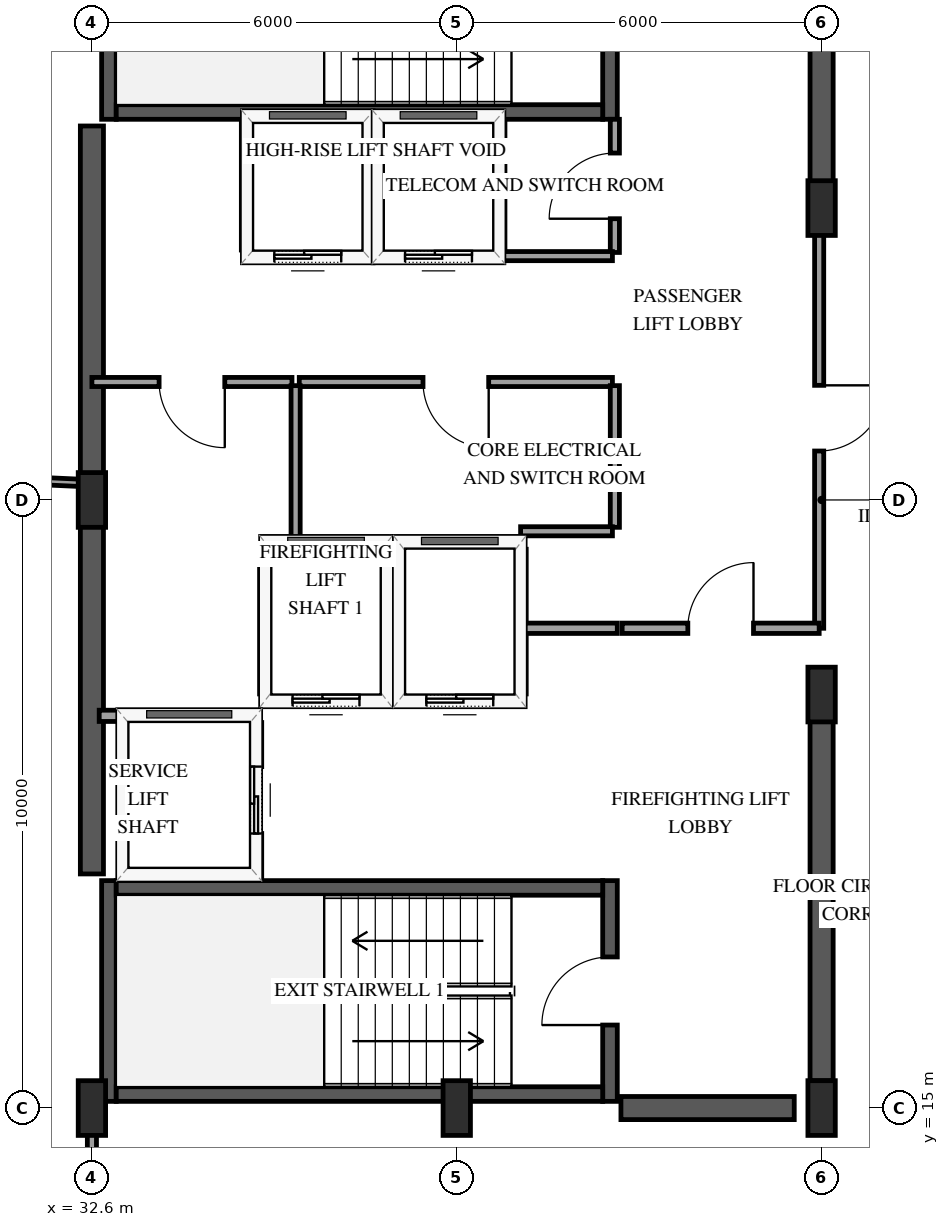
"""IFC4 building model, lengths in metres.
Left out: names, types, materials, properties, quantities, classifications, styles, units other than length and angle.
Written with IfcOpenShell. Run it as: python <this file> out.ifc"""

import sys

from ifc_helpers import new_model, si_unit, direction, frame, frame_2d, origin, origin_2d, place, context, subcontext, project, spatial, rectangle, extrude, element, fill, save


model = new_model("IFC4")
c1 = context("Model", 3, precision=1e-05, world=origin(), true_north=direction((0.0, 1.0)))
c2 = subcontext(c1, "Body", "Model", "MODEL_VIEW")
j1 = project(units=[si_unit("LENGTHUNIT", "METRE"), si_unit("PLANEANGLEUNIT", "RADIAN")], contexts=[c1])
p1 = place(None, origin())
s1 = spatial("IfcSite", under=j1, at=p1, CompositionType="ELEMENT")
p2 = place(p1, origin())
s2 = spatial("IfcBuilding", under=s1, at=p2, CompositionType="ELEMENT")
p3 = place(p2, frame((0.0, 0.0, 293.05)))
s3 = spatial("IfcBuildingStorey", under=s2, at=p3, CompositionType="ELEMENT", Elevation=293.05)
p4 = place(p3, frame((32.88, 15.11, 0.0), z_axis=(0.0, 0.0, 1.0), x_axis=(0.0, 1.0, 0.0)))
e1 = element("IfcWall", 1, at=p4, inside=s3, PredefinedType="SHEAR", context=c2, shape_type="SweptSolid", body=[
    extrude(rectangle(XDim=3.63, YDim=0.24, at=frame_2d((1.815, 0.0))), origin(), (0.0, 0.0, 1.0), 4.2),
])
p5 = place(p3, frame((41.12, 15.11, 0.0), z_axis=(0.0, 0.0, 1.0), x_axis=(0.0, 1.0, 0.0)))
e2 = element("IfcWall", 2, at=p5, inside=s3, PredefinedType="SHEAR", context=c2, shape_type="SweptSolid", body=[
    extrude(rectangle(XDim=3.63, YDim=0.24, at=frame_2d((1.815, 0.0))), origin(), (0.0, 0.0, 1.0), 4.2),
])
p6 = place(p5, frame((1.255, 0.0, 0.0)))
e3 = element("IfcOpeningElement", 3, at=p6, cuts=e2, PredefinedType="OPENING", context=c2, shape_type="SweptSolid", body=[
    extrude(rectangle(XDim=1.12, YDim=2.15, at=frame_2d((0.56, 1.075))), frame((0.0, 0.13, 0.0), z_axis=(0.0, -1.0, 0.0), x_axis=(1.0, 0.0, 0.0)), (0.0, 0.0, 1.0), 0.26),
])
for number, where, z_axis, x_axis in (
    (4, (33.0, 15.23, 0.0), (0.0, 0.0, 1.0), (1.0, 0.0, 0.0)),
    (5, (33.0, 18.62, 0.0), (0.0, 0.0, 1.0), (1.0, 0.0, 0.0)),
):
    element("IfcWall", number, at=place(p3, frame(where, z_axis=z_axis, x_axis=x_axis)), inside=s3, PredefinedType="SHEAR", context=c2, shape_type="SweptSolid", body=[
        extrude(rectangle(XDim=8.0, YDim=0.24, at=frame_2d((4.0, 0.0))), origin(), (0.0, 0.0, 1.0), 4.2),
    ])
p7 = place(p3, frame((32.88, 31.26, 0.0), z_axis=(0.0, 0.0, 1.0), x_axis=(0.0, 1.0, 0.0)))
e6 = element("IfcWall", 6, at=p7, inside=s3, PredefinedType="SHEAR", context=c2, shape_type="SweptSolid", body=[
    extrude(rectangle(XDim=3.63, YDim=0.24, at=frame_2d((1.815, 0.0))), origin(), (0.0, 0.0, 1.0), 4.2),
])
p8 = place(p3, frame((41.12, 31.26, 0.0), z_axis=(0.0, 0.0, 1.0), x_axis=(0.0, 1.0, 0.0)))
e7 = element("IfcWall", 7, at=p8, inside=s3, PredefinedType="SHEAR", context=c2, shape_type="SweptSolid", body=[
    extrude(rectangle(XDim=3.63, YDim=0.24, at=frame_2d((1.815, 0.0))), origin(), (0.0, 0.0, 1.0), 4.2),
])
p9 = place(p8, frame((1.255, 0.0, 0.0)))
e8 = element("IfcOpeningElement", 8, at=p9, cuts=e7, PredefinedType="OPENING", context=c2, shape_type="SweptSolid", body=[
    extrude(rectangle(XDim=1.12, YDim=2.15, at=frame_2d((0.56, 1.075))), frame((0.0, 0.13, 0.0), z_axis=(0.0, -1.0, 0.0), x_axis=(1.0, 0.0, 0.0)), (0.0, 0.0, 1.0), 0.26),
])
p10 = place(p3, frame((33.0, 31.38, 0.0), z_axis=(0.0, 0.0, 1.0), x_axis=(1.0, 0.0, 0.0)))
e9 = element("IfcWall", 9, at=p10, inside=s3, PredefinedType="SHEAR", context=c2, shape_type="SweptSolid", body=[
    extrude(rectangle(XDim=8.0, YDim=0.24, at=frame_2d((4.0, 0.0))), origin(), (0.0, 0.0, 1.0), 4.2),
])
p11 = place(p3, frame((32.6, 18.85, 0.0), z_axis=(0.0, 0.0, 1.0), x_axis=(0.0, 1.0, 0.0)))
e10 = element("IfcWall", 10, at=p11, inside=s3, PredefinedType="SHEAR", context=c2, shape_type="SweptSolid", body=[
    extrude(rectangle(XDim=12.3, YDim=0.38, at=frame_2d((6.15, 0.0))), origin(), (0.0, 0.0, 1.0), 4.2),
])
p12 = place(p3, frame((41.3, 15.0, 0.0), z_axis=(0.0, 0.0, 1.0), x_axis=(1.0, 0.0, 0.0)))
e11 = element("IfcWall", 11, at=p12, inside=s3, PredefinedType="SHEAR", context=c2, shape_type="SweptSolid", body=[
    extrude(rectangle(XDim=2.85, YDim=0.38, at=frame_2d((1.425, 0.0))), origin(), (0.0, 0.0, 1.0), 4.2),
])
p13 = place(p3, frame((44.6, 15.45, 0.0), z_axis=(0.0, 0.0, 1.0), x_axis=(0.0, 1.0, 0.0)))
e12 = element("IfcWall", 12, at=p13, inside=s3, PredefinedType="SHEAR", context=c2, shape_type="SweptSolid", body=[
    extrude(rectangle(XDim=6.35, YDim=0.38, at=frame_2d((3.175, 0.0))), origin(), (0.0, 0.0, 1.0), 4.2),
])
p14 = place(p3, frame((44.6, 29.8, 0.0), z_axis=(0.0, 0.0, 1.0), x_axis=(0.0, 1.0, 0.0)))
e13 = element("IfcWall", 13, at=p14, inside=s3, PredefinedType="SHEAR", context=c2, shape_type="SweptSolid", body=[
    extrude(rectangle(XDim=4.75, YDim=0.38, at=frame_2d((2.375, 0.0))), origin(), (0.0, 0.0, 1.0), 4.2),
])
for number, where, z_axis, x_axis in (
    (14, (32.6, 15.0, -0.305), (0.0, 0.0, 1.0), (1.0, 0.0, 0.0)),
    (15, (32.6, 25.0, -0.305), (0.0, 0.0, 1.0), (1.0, 0.0, 0.0)),
    (16, (38.6, 15.0, -0.305), (0.0, 0.0, 1.0), (1.0, 0.0, 0.0)),
    (17, (44.6, 15.0, -0.305), (0.0, 0.0, 1.0), (1.0, 0.0, 0.0)),
    (18, (44.6, 21.8, -0.305), (0.0, 0.0, 1.0), (1.0, 0.0, 0.0)),
    (19, (44.6, 29.8, -0.305), (0.0, 0.0, 1.0), (1.0, 0.0, 0.0)),
):
    element("IfcColumn", number, at=place(p3, frame(where, z_axis=z_axis, x_axis=x_axis)), inside=s3, PredefinedType="PILASTER", context=c2, shape_type="SweptSolid", body=[
        extrude(rectangle(XDim=0.45, YDim=0.9, at=origin_2d()), origin(), (0.0, 0.0, 1.0), 4.505),
    ])
p15 = place(p3, frame((35.45, 21.7, 0.0), z_axis=(0.0, 0.0, 1.0), x_axis=(1.0, 0.0, 0.0)))
e20 = element("IfcWall", 20, at=p15, inside=s3, PredefinedType="SOLIDWALL", context=c2, shape_type="SweptSolid", body=[
    extrude(rectangle(XDim=2.0, YDim=0.185, at=frame_2d((1.0, 0.0))), origin(), (0.0, 0.0, 1.0), 3.895),
])
p16 = place(p15, frame((0.45, 0.0, 0.0)))
e21 = element("IfcOpeningElement", 21, at=p16, cuts=e20, PredefinedType="OPENING", context=c2, shape_type="SweptSolid", body=[
    extrude(rectangle(XDim=1.1, YDim=2.15, at=frame_2d((0.55, 1.075))), frame((0.0, 0.103, 0.0), z_axis=(0.0, -1.0, 0.0), x_axis=(1.0, 0.0, 0.0)), (0.0, 0.0, 1.0), 0.205),
])
p17 = place(p3, frame((35.45, 24.3, 0.0), z_axis=(0.0, 0.0, 1.0), x_axis=(1.0, 0.0, 0.0)))
e22 = element("IfcWall", 22, at=p17, inside=s3, PredefinedType="SOLIDWALL", context=c2, shape_type="SweptSolid", body=[
    extrude(rectangle(XDim=2.0, YDim=0.185, at=frame_2d((1.0, 0.0))), origin(), (0.0, 0.0, 1.0), 3.895),
])
for number, where, z_axis, x_axis in (
    (23, (35.45, 21.81, 0.0), (0.0, 0.0, 1.0), (0.0, 1.0, 0.0)),
    (24, (37.45, 21.81, 0.0), (0.0, 0.0, 1.0), (0.0, 1.0, 0.0)),
):
    element("IfcWall", number, at=place(p3, frame(where, z_axis=z_axis, x_axis=x_axis)), inside=s3, PredefinedType="SOLIDWALL", context=c2, shape_type="SweptSolid", body=[
        extrude(rectangle(XDim=2.38, YDim=0.185, at=frame_2d((1.19, 0.0))), origin(), (0.0, 0.0, 1.0), 3.895),
    ])
p18 = place(p3, frame((37.65, 21.7, 0.0), z_axis=(0.0, 0.0, 1.0), x_axis=(1.0, 0.0, 0.0)))
e25 = element("IfcWall", 25, at=p18, inside=s3, PredefinedType="SOLIDWALL", context=c2, shape_type="SweptSolid", body=[
    extrude(rectangle(XDim=2.0, YDim=0.185, at=frame_2d((1.0, 0.0))), origin(), (0.0, 0.0, 1.0), 3.895),
])
p19 = place(p18, frame((0.45, 0.0, 0.0)))
e26 = element("IfcOpeningElement", 26, at=p19, cuts=e25, PredefinedType="OPENING", context=c2, shape_type="SweptSolid", body=[
    extrude(rectangle(XDim=1.1, YDim=2.15, at=frame_2d((0.55, 1.075))), frame((0.0, 0.103, 0.0), z_axis=(0.0, -1.0, 0.0), x_axis=(1.0, 0.0, 0.0)), (0.0, 0.0, 1.0), 0.205),
])
p20 = place(p3, frame((37.65, 24.3, 0.0), z_axis=(0.0, 0.0, 1.0), x_axis=(1.0, 0.0, 0.0)))
e27 = element("IfcWall", 27, at=p20, inside=s3, PredefinedType="SOLIDWALL", context=c2, shape_type="SweptSolid", body=[
    extrude(rectangle(XDim=2.0, YDim=0.185, at=frame_2d((1.0, 0.0))), origin(), (0.0, 0.0, 1.0), 3.895),
])
p21 = place(p3, frame((39.65, 21.81, 0.0), z_axis=(0.0, 0.0, 1.0), x_axis=(0.0, 1.0, 0.0)))
e28 = element("IfcWall", 28, at=p21, inside=s3, PredefinedType="SOLIDWALL", context=c2, shape_type="SweptSolid", body=[
    extrude(rectangle(XDim=2.38, YDim=0.185, at=frame_2d((1.19, 0.0))), origin(), (0.0, 0.0, 1.0), 3.895),
])
p22 = place(p3, frame((32.72, 21.45, 0.0), z_axis=(0.0, 0.0, 1.0), x_axis=(1.0, 0.0, 0.0)))
e29 = element("IfcWall", 29, at=p22, inside=s3, PredefinedType="SOLIDWALL", context=c2, shape_type="SweptSolid", body=[
    extrude(rectangle(XDim=2.58, YDim=0.185, at=frame_2d((1.29, 0.0))), origin(), (0.0, 0.0, 1.0), 3.895),
])
p23 = place(p3, frame((35.3, 18.79, 0.0), z_axis=(0.0, 0.0, 1.0), x_axis=(0.0, 1.0, 0.0)))
e30 = element("IfcWall", 30, at=p23, inside=s3, PredefinedType="SOLIDWALL", context=c2, shape_type="SweptSolid", body=[
    extrude(rectangle(XDim=2.55, YDim=0.185, at=frame_2d((1.275, 0.0))), origin(), (0.0, 0.0, 1.0), 3.895),
])
p24 = place(p23, frame((0.725, 0.0, 0.0)))
e31 = element("IfcOpeningElement", 31, at=p24, cuts=e30, PredefinedType="OPENING", context=c2, shape_type="SweptSolid", body=[
    extrude(rectangle(XDim=1.1, YDim=2.15, at=frame_2d((0.55, 1.075))), frame((0.0, 0.103, 0.0), z_axis=(0.0, -1.0, 0.0), x_axis=(1.0, 0.0, 0.0)), (0.0, 0.0, 1.0), 0.205),
])
p25 = place(p3, frame((35.15, 29.0, 0.0), z_axis=(0.0, 0.0, 1.0), x_axis=(1.0, 0.0, 0.0)))
e32 = element("IfcWall", 32, at=p25, inside=s3, PredefinedType="SOLIDWALL", context=c2, shape_type="SweptSolid", body=[
    extrude(rectangle(XDim=2.0, YDim=0.185, at=frame_2d((1.0, 0.0))), origin(), (0.0, 0.0, 1.0), 3.895),
])
p26 = place(p25, frame((0.45, 0.0, 0.0)))
e33 = element("IfcOpeningElement", 33, at=p26, cuts=e32, PredefinedType="OPENING", context=c2, shape_type="SweptSolid", body=[
    extrude(rectangle(XDim=1.1, YDim=2.15, at=frame_2d((0.55, 1.075))), frame((0.0, 0.103, 0.0), z_axis=(0.0, -1.0, 0.0), x_axis=(1.0, 0.0, 0.0)), (0.0, 0.0, 1.0), 0.205),
])
for number, where, z_axis, x_axis in (
    (34, (35.15, 29.11, 0.0), (0.0, 0.0, 1.0), (0.0, 1.0, 0.0)),
    (35, (37.15, 29.11, 0.0), (0.0, 0.0, 1.0), (0.0, 1.0, 0.0)),
):
    element("IfcWall", number, at=place(p3, frame(where, z_axis=z_axis, x_axis=x_axis)), inside=s3, PredefinedType="SOLIDWALL", context=c2, shape_type="SweptSolid", body=[
        extrude(rectangle(XDim=2.1, YDim=0.185, at=frame_2d((1.05, 0.0))), origin(), (0.0, 0.0, 1.0), 3.895),
    ])
p27 = place(p3, frame((37.3, 29.0, 0.0), z_axis=(0.0, 0.0, 1.0), x_axis=(1.0, 0.0, 0.0)))
e36 = element("IfcWall", 36, at=p27, inside=s3, PredefinedType="SOLIDWALL", context=c2, shape_type="SweptSolid", body=[
    extrude(rectangle(XDim=2.0, YDim=0.185, at=frame_2d((1.0, 0.0))), origin(), (0.0, 0.0, 1.0), 3.895),
])
p28 = place(p27, frame((0.45, 0.0, 0.0)))
e37 = element("IfcOpeningElement", 37, at=p28, cuts=e36, PredefinedType="OPENING", context=c2, shape_type="SweptSolid", body=[
    extrude(rectangle(XDim=1.1, YDim=2.15, at=frame_2d((0.55, 1.075))), frame((0.0, 0.103, 0.0), z_axis=(0.0, -1.0, 0.0), x_axis=(1.0, 0.0, 0.0)), (0.0, 0.0, 1.0), 0.205),
])
p29 = place(p3, frame((39.3, 29.11, 0.0), z_axis=(0.0, 0.0, 1.0), x_axis=(0.0, 1.0, 0.0)))
e38 = element("IfcWall", 38, at=p29, inside=s3, PredefinedType="SOLIDWALL", context=c2, shape_type="SweptSolid", body=[
    extrude(rectangle(XDim=2.1, YDim=0.185, at=frame_2d((1.05, 0.0))), origin(), (0.0, 0.0, 1.0), 3.895),
])
p30 = place(p3, frame((32.527, 25.276, 0.0), z_axis=(0.0, 0.0, 1.0), x_axis=(-0.998965703411, 0.045470027593, 0.0)))
e39 = element("IfcWall", 39, at=p30, inside=s3, PredefinedType="PARTITIONING", context=c2, shape_type="SweptSolid", body=[
    extrude(rectangle(XDim=7.458, YDim=0.12, at=frame_2d((3.729, 0.0))), origin(), (0.0, 0.0, 1.0), 3.19),
])
p31 = place(p3, frame((44.56, 29.8, 0.0), z_axis=(0.0, 0.0, 1.0), x_axis=(0.0, -1.0, 0.0)))
e40 = element("IfcWall", 40, at=p31, inside=s3, PredefinedType="PARTITIONING", context=c2, shape_type="SweptSolid", body=[
    extrude(rectangle(XDim=6.91, YDim=0.15, at=frame_2d((3.455, 0.0))), origin(), (0.0, 0.0, 1.0), 2.935),
])
p32 = place(p31, frame((2.915, 0.0, 0.0)))
e41 = element("IfcOpeningElement", 41, at=p32, cuts=e40, PredefinedType="OPENING", context=c2, shape_type="SweptSolid", body=[
    extrude(rectangle(XDim=1.08, YDim=2.15, at=frame_2d((0.54, 1.075))), frame((0.0, 0.085, 0.0), z_axis=(0.0, -1.0, 0.0), x_axis=(1.0, 0.0, 0.0)), (0.0, 0.0, 1.0), 0.17),
])
p33 = place(p3, frame((41.16, 26.94, 0.0), z_axis=(0.0, 0.0, 1.0), x_axis=(-1.0, 0.0, 0.0)))
e42 = element("IfcWall", 42, at=p33, inside=s3, PredefinedType="PARTITIONING", context=c2, shape_type="SweptSolid", body=[
    extrude(rectangle(XDim=5.15, YDim=0.15, at=frame_2d((2.575, 0.0))), origin(), (0.0, 0.0, 1.0), 3.895),
])
p34 = place(p33, frame((2.035, 0.0, 0.0)))
e43 = element("IfcOpeningElement", 43, at=p34, cuts=e42, PredefinedType="OPENING", context=c2, shape_type="SweptSolid", body=[
    extrude(rectangle(XDim=1.08, YDim=2.15, at=frame_2d((0.54, 1.075))), frame((0.0, 0.085, 0.0), z_axis=(0.0, -1.0, 0.0), x_axis=(1.0, 0.0, 0.0)), (0.0, 0.0, 1.0), 0.17),
])
p35 = place(p3, frame((35.89, 26.94, 0.0), z_axis=(0.0, 0.0, 1.0), x_axis=(-1.0, 0.0, 0.0)))
e44 = element("IfcWall", 44, at=p35, inside=s3, PredefinedType="PARTITIONING", context=c2, shape_type="SweptSolid", body=[
    extrude(rectangle(XDim=3.29, YDim=0.15, at=frame_2d((1.645, 0.0))), origin(), (0.0, 0.0, 1.0), 3.895),
])
p36 = place(p35, frame((1.105, 0.0, 0.0)))
e45 = element("IfcOpeningElement", 45, at=p36, cuts=e44, PredefinedType="OPENING", context=c2, shape_type="SweptSolid", body=[
    extrude(rectangle(XDim=1.08, YDim=2.15, at=frame_2d((0.54, 1.075))), frame((0.0, 0.085, 0.0), z_axis=(0.0, -1.0, 0.0), x_axis=(1.0, 0.0, 0.0)), (0.0, 0.0, 1.0), 0.17),
])
p37 = place(p3, frame((41.32, 22.89, 0.0), z_axis=(0.0, 0.0, 1.0), x_axis=(1.0, 0.0, 0.0)))
e46 = element("IfcWall", 46, at=p37, inside=s3, PredefinedType="PARTITIONING", context=c2, shape_type="SweptSolid", body=[
    extrude(rectangle(XDim=3.24, YDim=0.17, at=frame_2d((1.62, 0.0))), origin(), (0.0, 0.0, 1.0), 3.895),
])
p38 = place(p37, frame((1.08, 0.0, 0.0)))
e47 = element("IfcOpeningElement", 47, at=p38, cuts=e46, PredefinedType="OPENING", context=c2, shape_type="SweptSolid", body=[
    extrude(rectangle(XDim=1.08, YDim=2.15, at=frame_2d((0.54, 1.075))), frame((0.0, 0.095, 0.0), z_axis=(0.0, -1.0, 0.0), x_axis=(1.0, 0.0, 0.0)), (0.0, 0.0, 1.0), 0.19),
])
p39 = place(p3, frame((35.95, 26.88, 0.0), z_axis=(0.0, 0.0, 1.0), x_axis=(0.0, -1.0, 0.0)))
e48 = element("IfcWall", 48, at=p39, inside=s3, PredefinedType="PARTITIONING", context=c2, shape_type="SweptSolid", body=[
    extrude(rectangle(XDim=2.58, YDim=0.15, at=frame_2d((1.29, 0.0))), origin(), (0.0, 0.0, 1.0), 3.895),
])
p40 = place(p3, frame((41.2, 24.55, 0.0), z_axis=(0.0, 0.0, 1.0), x_axis=(0.0, 1.0, 0.0)))
e49 = element("IfcWall", 49, at=p40, inside=s3, PredefinedType="PARTITIONING", context=c2, shape_type="SweptSolid", body=[
    extrude(rectangle(XDim=2.33, YDim=0.15, at=frame_2d((1.165, 0.0))), origin(), (0.0, 0.0, 1.0), 3.895),
])
p41 = place(p3, frame((41.2, 29.07, 0.0), z_axis=(0.0, 0.0, 1.0), x_axis=(0.0, 1.0, 0.0)))
e50 = element("IfcWall", 50, at=p41, inside=s3, PredefinedType="PARTITIONING", context=c2, shape_type="SweptSolid", body=[
    extrude(rectangle(XDim=2.19, YDim=0.15, at=frame_2d((1.095, 0.0))), origin(), (0.0, 0.0, 1.0), 3.895),
])
p42 = place(p41, frame((0.555, 0.0, 0.0)))
e51 = element("IfcOpeningElement", 51, at=p42, cuts=e50, PredefinedType="OPENING", context=c2, shape_type="SweptSolid", body=[
    extrude(rectangle(XDim=1.08, YDim=2.15, at=frame_2d((0.54, 1.075))), frame((0.0, 0.085, 0.0), z_axis=(0.0, -1.0, 0.0), x_axis=(1.0, 0.0, 0.0)), (0.0, 0.0, 1.0), 0.17),
])
p43 = place(p3, frame((39.3, 29.01, 0.0), z_axis=(0.0, 0.0, 1.0), x_axis=(1.0, 0.0, 0.0)))
e52 = element("IfcWall", 52, at=p43, inside=s3, PredefinedType="PARTITIONING", context=c2, shape_type="SweptSolid", body=[
    extrude(rectangle(XDim=1.86, YDim=0.15, at=frame_2d((0.93, 0.0))), origin(), (0.0, 0.0, 1.0), 3.895),
])
p44 = place(p3, frame((39.72, 22.89, 0.0), z_axis=(0.0, 0.0, 1.0), x_axis=(1.0, 0.0, 0.0)))
e53 = element("IfcWall", 53, at=p44, inside=s3, PredefinedType="PARTITIONING", context=c2, shape_type="SweptSolid", body=[
    extrude(rectangle(XDim=1.52, YDim=0.17, at=frame_2d((0.76, 0.0))), origin(), (0.0, 0.0, 1.0), 3.895),
])
p45 = place(p3, frame((32.6, 13.37, 0.0), z_axis=(0.0, 0.0, 1.0), x_axis=(0.0, 1.0, 0.0)))
e54 = element("IfcWall", 54, at=p45, inside=s3, PredefinedType="PARTITIONING", context=c2, shape_type="SweptSolid", body=[
    extrude(rectangle(XDim=1.51, YDim=0.15, at=frame_2d((0.755, 0.0))), origin(), (0.0, 0.0, 1.0), 3.895),
])
p46 = place(p3, frame((39.65, 24.485, 0.0), z_axis=(0.0, 0.0, 1.0), x_axis=(1.0, 0.0, 0.0)))
e55 = element("IfcWall", 55, at=p46, inside=s3, PredefinedType="PARTITIONING", context=c2, shape_type="SweptSolid", body=[
    extrude(rectangle(XDim=1.51, YDim=0.15, at=frame_2d((0.755, 0.0))), origin(), (0.0, 0.0, 1.0), 3.895),
])
p47 = place(p16, origin())
e56 = element("IfcDoor", 56, at=p47, inside=s3, OperationType="SLIDING_TO_LEFT", PredefinedType="DOOR", context=c2, shape_type="SweptSolid", body=[
    extrude(rectangle(XDim=1.1, YDim=2.15, at=frame_2d((0.55, 1.075))), frame((0.0, 0.025, 0.0), z_axis=(0.0, -1.0, 0.0), x_axis=(1.0, 0.0, 0.0)), (0.0, 0.0, 1.0), 0.05),
])
fill(e21, e56)
p48 = place(p19, origin())
e57 = element("IfcDoor", 57, at=p48, inside=s3, OperationType="SLIDING_TO_LEFT", PredefinedType="DOOR", context=c2, shape_type="SweptSolid", body=[
    extrude(rectangle(XDim=1.1, YDim=2.15, at=frame_2d((0.55, 1.075))), frame((0.0, 0.025, 0.0), z_axis=(0.0, -1.0, 0.0), x_axis=(1.0, 0.0, 0.0)), (0.0, 0.0, 1.0), 0.05),
])
fill(e26, e57)
p49 = place(p24, origin())
e58 = element("IfcDoor", 58, at=p49, inside=s3, OperationType="SLIDING_TO_LEFT", PredefinedType="DOOR", context=c2, shape_type="SweptSolid", body=[
    extrude(rectangle(XDim=1.1, YDim=2.15, at=frame_2d((0.55, 1.075))), frame((0.0, 0.025, 0.0), z_axis=(0.0, -1.0, 0.0), x_axis=(1.0, 0.0, 0.0)), (0.0, 0.0, 1.0), 0.05),
])
fill(e31, e58)
p50 = place(p26, origin())
e59 = element("IfcDoor", 59, at=p50, inside=s3, OperationType="SLIDING_TO_LEFT", PredefinedType="DOOR", context=c2, shape_type="SweptSolid", body=[
    extrude(rectangle(XDim=1.1, YDim=2.15, at=frame_2d((0.55, 1.075))), frame((0.0, 0.025, 0.0), z_axis=(0.0, -1.0, 0.0), x_axis=(1.0, 0.0, 0.0)), (0.0, 0.0, 1.0), 0.05),
])
fill(e33, e59)
p51 = place(p28, origin())
e60 = element("IfcDoor", 60, at=p51, inside=s3, OperationType="SLIDING_TO_LEFT", PredefinedType="DOOR", context=c2, shape_type="SweptSolid", body=[
    extrude(rectangle(XDim=1.1, YDim=2.15, at=frame_2d((0.55, 1.075))), frame((0.0, 0.025, 0.0), z_axis=(0.0, -1.0, 0.0), x_axis=(1.0, 0.0, 0.0)), (0.0, 0.0, 1.0), 0.05),
])
fill(e37, e60)
p52 = place(p6, origin())
e61 = element("IfcDoor", 61, at=p52, inside=s3, OperationType="SINGLE_SWING_LEFT", PredefinedType="DOOR", context=c2, shape_type="SweptSolid", body=[
    extrude(rectangle(XDim=1.12, YDim=2.15, at=frame_2d((0.56, 1.075))), frame((0.0, 0.025, 0.0), z_axis=(0.0, -1.0, 0.0), x_axis=(1.0, 0.0, 0.0)), (0.0, 0.0, 1.0), 0.05),
])
fill(e3, e61)
p53 = place(p32, origin())
e62 = element("IfcDoor", 62, at=p53, inside=s3, OperationType="SINGLE_SWING_LEFT", PredefinedType="DOOR", context=c2, shape_type="SweptSolid", body=[
    extrude(rectangle(XDim=1.08, YDim=2.15, at=frame_2d((0.54, 1.075))), frame((0.0, 0.025, 0.0), z_axis=(0.0, -1.0, 0.0), x_axis=(1.0, 0.0, 0.0)), (0.0, 0.0, 1.0), 0.05),
])
fill(e41, e62)
p54 = place(p34, origin())
e63 = element("IfcDoor", 63, at=p54, inside=s3, OperationType="SINGLE_SWING_LEFT", PredefinedType="DOOR", context=c2, shape_type="SweptSolid", body=[
    extrude(rectangle(XDim=1.08, YDim=2.15, at=frame_2d((0.54, 1.075))), frame((0.0, 0.025, 0.0), z_axis=(0.0, -1.0, 0.0), x_axis=(1.0, 0.0, 0.0)), (0.0, 0.0, 1.0), 0.05),
])
fill(e43, e63)
p55 = place(p36, origin())
e64 = element("IfcDoor", 64, at=p55, inside=s3, OperationType="SINGLE_SWING_LEFT", PredefinedType="DOOR", context=c2, shape_type="SweptSolid", body=[
    extrude(rectangle(XDim=1.08, YDim=2.15, at=frame_2d((0.54, 1.075))), frame((0.0, 0.025, 0.0), z_axis=(0.0, -1.0, 0.0), x_axis=(1.0, 0.0, 0.0)), (0.0, 0.0, 1.0), 0.05),
])
fill(e45, e64)
p56 = place(p38, origin())
e65 = element("IfcDoor", 65, at=p56, inside=s3, OperationType="SINGLE_SWING_RIGHT", PredefinedType="DOOR", context=c2, shape_type="SweptSolid", body=[
    extrude(rectangle(XDim=1.08, YDim=2.15, at=frame_2d((0.54, 1.075))), frame((0.0, 0.025, 0.0), z_axis=(0.0, -1.0, 0.0), x_axis=(1.0, 0.0, 0.0)), (0.0, 0.0, 1.0), 0.05),
])
fill(e47, e65)
p57 = place(p42, origin())
e66 = element("IfcDoor", 66, at=p57, inside=s3, OperationType="SINGLE_SWING_LEFT", PredefinedType="DOOR", context=c2, shape_type="SweptSolid", body=[
    extrude(rectangle(XDim=1.08, YDim=2.15, at=frame_2d((0.54, 1.075))), frame((0.0, 0.025, 0.0), z_axis=(0.0, -1.0, 0.0), x_axis=(1.0, 0.0, 0.0)), (0.0, 0.0, 1.0), 0.05),
])
fill(e51, e66)
save(model, sys.argv[1])
